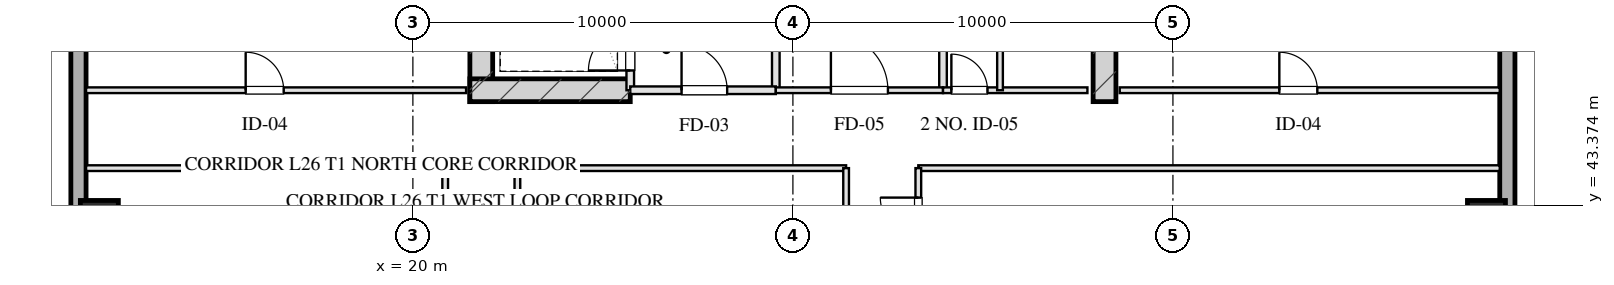
"""IFC4 building model, lengths in metres.
Left out: names, types, materials, properties, quantities, classifications, styles, units other than length and angle.
Written with IfcOpenShell. Run it as: python <this file> out.ifc"""

import sys

from ifc_helpers import new_model, si_unit, direction, frame, frame_2d, origin, origin_2d, place, context, subcontext, project, spatial, rectangle, hollow_rectangle, extrude, element, fill, save


model = new_model("IFC4")
c1 = context("Model", 3, precision=1e-05, world=origin(), true_north=direction((0.0, 1.0)))
c2 = subcontext(c1, "Body", "Model", "MODEL_VIEW")
j1 = project(units=[si_unit("LENGTHUNIT", "METRE"), si_unit("PLANEANGLEUNIT", "RADIAN")], contexts=[c1])
p1 = place(None, origin())
s1 = spatial("IfcSite", under=j1, at=p1, CompositionType="ELEMENT")
p2 = place(p1, origin())
s2 = spatial("IfcBuilding", under=s1, at=p2, CompositionType="ELEMENT")
p3 = place(p2, frame((0.0, 0.0, 103.5)))
s3 = spatial("IfcBuildingStorey", under=s2, at=p3, CompositionType="ELEMENT", Elevation=103.5)
for number, where, z_axis, x_axis in (
    (1, (21.8, 46.1, 0.0), (0.0, 0.0, 1.0), (0.0, 1.0, 0.0)),
    (2, (38.2, 46.1, 0.0), (0.0, 0.0, 1.0), (0.0, 1.0, 0.0)),
):
    element("IfcWall", number, at=place(p3, frame(where, z_axis=z_axis, x_axis=x_axis)), inside=s3, PredefinedType="SHEAR", context=c2, shape_type="SweptSolid", body=[
        extrude(rectangle(XDim=9.48, YDim=0.6, at=frame_2d((4.74, 0.0))), origin(), (0.0, 0.0, 1.0), 3.45),
    ])
p4 = place(p3, frame((21.5, 46.4, 0.0), z_axis=(0.0, 0.0, 1.0), x_axis=(1.0, 0.0, 0.0)))
e3 = element("IfcWall", 3, at=p4, inside=s3, PredefinedType="SHEAR", context=c2, shape_type="SweptSolid", body=[
    extrude(rectangle(XDim=4.22, YDim=0.6, at=frame_2d((2.11, 0.0))), origin(), (0.0, 0.0, 1.0), 3.45),
])
for number, where, z_axis, x_axis in (
    (4, (11.75, 43.0, 0.0), (0.0, 0.0, 1.0), (1.0, 0.0, 0.0)),
    (5, (48.25, 43.0, 0.0), (0.0, 0.0, 1.0), (1.0, 0.0, 0.0)),
):
    element("IfcColumn", number, at=place(p3, frame(where, z_axis=z_axis, x_axis=x_axis)), inside=s3, PredefinedType="COLUMN", context=c2, shape_type="SweptSolid", body=[
        extrude(hollow_rectangle(XDim=1.0, YDim=1.0, WallThickness=0.036, at=origin_2d()), origin(), (0.0, 0.0, 1.0), 3.451),
    ])
p5 = place(p3, frame((11.2, 9.0, 0.0), z_axis=(0.0, 0.0, 1.0), x_axis=(0.0, 1.0, 0.0)))
e6 = element("IfcWall", 6, at=p5, inside=s3, PredefinedType="SOLIDWALL", context=c2, shape_type="SweptSolid", body=[
    extrude(rectangle(XDim=50.0, YDim=0.4, at=frame_2d((25.0, 0.0))), origin(), (0.0, 0.0, 1.0), 2.61),
])
p6 = place(p5, frame((26.4, 0.0, 0.75)))
e7 = element("IfcOpeningElement", 7, at=p6, cuts=e6, PredefinedType="OPENING", context=c2, shape_type="SweptSolid", body=[
    extrude(rectangle(XDim=2.4, YDim=1.46, at=frame_2d((1.2, 0.73))), frame((0.0, 0.21, 0.0), z_axis=(0.0, -1.0, 0.0), x_axis=(1.0, 0.0, 0.0)), (0.0, 0.0, 1.0), 0.42),
])
p7 = place(p5, frame((21.35, 0.0, 0.0)))
e8 = element("IfcOpeningElement", 8, at=p7, cuts=e6, PredefinedType="OPENING", context=c2, shape_type="SweptSolid", body=[
    extrude(rectangle(XDim=1.1, YDim=2.15, at=frame_2d((0.55, 1.075))), frame((0.0, 0.21, 0.0), z_axis=(0.0, -1.0, 0.0), x_axis=(1.0, 0.0, 0.0)), (0.0, 0.0, 1.0), 0.42),
])
p8 = place(p3, frame((48.8, 59.0, 0.0), z_axis=(0.0, 0.0, 1.0), x_axis=(0.0, -1.0, 0.0)))
e9 = element("IfcWall", 9, at=p8, inside=s3, PredefinedType="SOLIDWALL", context=c2, shape_type="SweptSolid", body=[
    extrude(rectangle(XDim=50.0, YDim=0.4, at=frame_2d((25.0, 0.0))), origin(), (0.0, 0.0, 1.0), 2.61),
])
p9 = place(p8, frame((27.55, 0.0, 0.0)))
e10 = element("IfcOpeningElement", 10, at=p9, cuts=e9, PredefinedType="OPENING", context=c2, shape_type="SweptSolid", body=[
    extrude(rectangle(XDim=1.1, YDim=2.15, at=frame_2d((0.55, 1.075))), frame((0.0, 0.21, 0.0), z_axis=(0.0, -1.0, 0.0), x_axis=(1.0, 0.0, 0.0)), (0.0, 0.0, 1.0), 0.42),
])
p10 = place(p3, frame((25.72, 46.4, 0.0), z_axis=(0.0, 0.0, 1.0), x_axis=(0.0, 1.0, 0.0)))
e11 = element("IfcWall", 11, at=p10, inside=s3, PredefinedType="PARTITIONING", context=c2, shape_type="SweptSolid", body=[
    extrude(rectangle(XDim=1.9, YDim=0.2, at=frame_2d((0.95, 0.0))), origin(), (0.0, 0.0, 1.0), 3.175),
])
p11 = place(p10, frame((0.52, 0.0, 0.0)))
e12 = element("IfcOpeningElement", 12, at=p11, cuts=e11, PredefinedType="OPENING", context=c2, shape_type="SweptSolid", body=[
    extrude(rectangle(XDim=1.1, YDim=2.05, at=frame_2d((0.55, 1.025))), frame((0.0, 0.11, 0.0), z_axis=(0.0, -1.0, 0.0), x_axis=(1.0, 0.0, 0.0)), (0.0, 0.0, 1.0), 0.22),
])
p12 = place(p3, frame((29.55, 46.4, 0.0), z_axis=(0.0, 0.0, 1.0), x_axis=(0.0, 1.0, 0.0)))
e13 = element("IfcWall", 13, at=p12, inside=s3, PredefinedType="PARTITIONING", context=c2, shape_type="SweptSolid", body=[
    extrude(rectangle(XDim=8.43, YDim=0.2, at=frame_2d((4.215, 0.0))), origin(), (0.0, 0.0, 1.0), 3.175),
])
p13 = place(p3, frame((25.72, 46.4, 0.0), z_axis=(0.0, 0.0, 1.0), x_axis=(1.0, 0.0, 0.0)))
e14 = element("IfcWall", 14, at=p13, inside=s3, PredefinedType="PARTITIONING", context=c2, shape_type="SweptSolid", body=[
    extrude(rectangle(XDim=3.83, YDim=0.2, at=frame_2d((1.915, 0.0))), origin(), (0.0, 0.0, 1.0), 3.175),
])
p14 = place(p13, frame((1.35, 0.0, 0.0)))
e15 = element("IfcOpeningElement", 15, at=p14, cuts=e14, PredefinedType="OPENING", context=c2, shape_type="SweptSolid", body=[
    extrude(rectangle(XDim=1.2, YDim=2.05, at=frame_2d((0.6, 1.025))), frame((0.0, 0.11, 0.0), z_axis=(0.0, -1.0, 0.0), x_axis=(1.0, 0.0, 0.0)), (0.0, 0.0, 1.0), 0.22),
])
p15 = place(p3, frame((33.95, 46.4, 0.0), z_axis=(0.0, 0.0, 1.0), x_axis=(0.0, 1.0, 0.0)))
e16 = element("IfcWall", 16, at=p15, inside=s3, PredefinedType="PARTITIONING", context=c2, shape_type="SweptSolid", body=[
    extrude(rectangle(XDim=8.43, YDim=0.2, at=frame_2d((4.215, 0.0))), origin(), (0.0, 0.0, 1.0), 3.175),
])
p16 = place(p3, frame((29.55, 46.4, 0.0), z_axis=(0.0, 0.0, 1.0), x_axis=(1.0, 0.0, 0.0)))
e17 = element("IfcWall", 17, at=p16, inside=s3, PredefinedType="PARTITIONING", context=c2, shape_type="SweptSolid", body=[
    extrude(rectangle(XDim=4.4, YDim=0.15, at=frame_2d((2.2, 0.0))), origin(), (0.0, 0.0, 1.0), 3.175),
])
p17 = place(p16, frame((1.45, 0.0, 0.0)))
e18 = element("IfcOpeningElement", 18, at=p17, cuts=e17, PredefinedType="OPENING", context=c2, shape_type="SweptSolid", body=[
    extrude(rectangle(XDim=1.5, YDim=2.05, at=frame_2d((0.75, 1.025))), frame((0.0, 0.085, 0.0), z_axis=(0.0, -1.0, 0.0), x_axis=(1.0, 0.0, 0.0)), (0.0, 0.0, 1.0), 0.17),
])
p18 = place(p3, frame((33.95, 46.4, 0.0), z_axis=(0.0, 0.0, 1.0), x_axis=(1.0, 0.0, 0.0)))
e19 = element("IfcWall", 19, at=p18, inside=s3, PredefinedType="PARTITIONING", context=c2, shape_type="SweptSolid", body=[
    extrude(rectangle(XDim=3.8, YDim=0.15, at=frame_2d((1.9, 0.0))), origin(), (0.0, 0.0, 1.0), 3.175),
])
p19 = place(p18, frame((0.22, 0.0, 0.0)))
e20 = element("IfcOpeningElement", 20, at=p19, cuts=e19, PredefinedType="OPENING", context=c2, shape_type="SweptSolid", body=[
    extrude(rectangle(XDim=0.95, YDim=2.05, at=frame_2d((0.475, 1.025))), frame((0.0, 0.085, 0.0), z_axis=(0.0, -1.0, 0.0), x_axis=(1.0, 0.0, 0.0)), (0.0, 0.0, 1.0), 0.17),
])
p20 = place(p3, frame((35.45, 46.4, 0.0), z_axis=(0.0, 0.0, 1.0), x_axis=(0.0, 1.0, 0.0)))
e21 = element("IfcWall", 21, at=p20, inside=s3, PredefinedType="PARTITIONING", context=c2, shape_type="SweptSolid", body=[
    extrude(rectangle(XDim=8.43, YDim=0.15, at=frame_2d((4.215, 0.0))), origin(), (0.0, 0.0, 1.0), 2.765),
])
p21 = place(p20, frame((2.55, 0.0, 0.0)))
e22 = element("IfcOpeningElement", 22, at=p21, cuts=e21, PredefinedType="OPENING", context=c2, shape_type="SweptSolid", body=[
    extrude(rectangle(XDim=0.95, YDim=2.05, at=frame_2d((0.475, 1.025))), frame((0.0, 0.085, 0.0), z_axis=(0.0, -1.0, 0.0), x_axis=(1.0, 0.0, 0.0)), (0.0, 0.0, 1.0), 0.17),
])
p22 = place(p20, frame((4.7, 0.0, 0.0)))
e23 = element("IfcOpeningElement", 23, at=p22, cuts=e21, PredefinedType="OPENING", context=c2, shape_type="SweptSolid", body=[
    extrude(rectangle(XDim=0.9, YDim=2.05, at=frame_2d((0.45, 1.025))), frame((0.0, 0.085, 0.0), z_axis=(0.0, -1.0, 0.0), x_axis=(1.0, 0.0, 0.0)), (0.0, 0.0, 1.0), 0.17),
])
p23 = place(p20, frame((6.8, 0.0, 0.0)))
e24 = element("IfcOpeningElement", 24, at=p23, cuts=e21, PredefinedType="OPENING", context=c2, shape_type="SweptSolid", body=[
    extrude(rectangle(XDim=0.9, YDim=2.05, at=frame_2d((0.45, 1.025))), frame((0.0, 0.085, 0.0), z_axis=(0.0, -1.0, 0.0), x_axis=(1.0, 0.0, 0.0)), (0.0, 0.0, 1.0), 0.17),
])
p24 = place(p3, frame((11.4, 46.4, 0.0), z_axis=(0.0, 0.0, 1.0), x_axis=(1.0, 0.0, 0.0)))
e25 = element("IfcWall", 25, at=p24, inside=s3, PredefinedType="PARTITIONING", context=c2, shape_type="SweptSolid", body=[
    extrude(rectangle(XDim=10.0, YDim=0.15, at=frame_2d((5.0, 0.0))), origin(), (0.0, 0.0, 1.0), 3.175),
])
p25 = place(p24, frame((4.2, 0.0, 0.0)))
e26 = element("IfcOpeningElement", 26, at=p25, cuts=e25, PredefinedType="OPENING", context=c2, shape_type="SweptSolid", body=[
    extrude(rectangle(XDim=1.0, YDim=2.05, at=frame_2d((0.5, 1.025))), frame((0.0, 0.085, 0.0), z_axis=(0.0, -1.0, 0.0), x_axis=(1.0, 0.0, 0.0)), (0.0, 0.0, 1.0), 0.17),
])
p26 = place(p3, frame((38.6, 46.4, 0.0), z_axis=(0.0, 0.0, 1.0), x_axis=(1.0, 0.0, 0.0)))
e27 = element("IfcWall", 27, at=p26, inside=s3, PredefinedType="PARTITIONING", context=c2, shape_type="SweptSolid", body=[
    extrude(rectangle(XDim=10.0, YDim=0.15, at=frame_2d((5.0, 0.0))), origin(), (0.0, 0.0, 1.0), 3.175),
])
p27 = place(p26, frame((4.2, 0.0, 0.0)))
e28 = element("IfcOpeningElement", 28, at=p27, cuts=e27, PredefinedType="OPENING", context=c2, shape_type="SweptSolid", body=[
    extrude(rectangle(XDim=1.0, YDim=2.05, at=frame_2d((0.5, 1.025))), frame((0.0, 0.085, 0.0), z_axis=(0.0, -1.0, 0.0), x_axis=(1.0, 0.0, 0.0)), (0.0, 0.0, 1.0), 0.17),
])
p28 = place(p3, frame((11.4, 44.35, 0.0), z_axis=(0.0, 0.0, 1.0), x_axis=(1.0, 0.0, 0.0)))
e29 = element("IfcWall", 29, at=p28, inside=s3, PredefinedType="PARTITIONING", context=c2, shape_type="SweptSolid", body=[
    extrude(rectangle(XDim=9.45, YDim=0.15, at=frame_2d((4.725, 0.0))), origin(), (0.0, 0.0, 1.0), 3.175),
])
p29 = place(p3, frame((22.75, 44.35, 0.0), z_axis=(0.0, 0.0, 1.0), x_axis=(1.0, 0.0, 0.0)))
e30 = element("IfcWall", 30, at=p29, inside=s3, PredefinedType="PARTITIONING", context=c2, shape_type="SweptSolid", body=[
    extrude(rectangle(XDim=8.65, YDim=0.15, at=frame_2d((4.325, 0.0))), origin(), (0.0, 0.0, 1.0), 3.175),
])
p30 = place(p3, frame((33.3, 44.35, 0.0), z_axis=(0.0, 0.0, 1.0), x_axis=(1.0, 0.0, 0.0)))
e31 = element("IfcWall", 31, at=p30, inside=s3, PredefinedType="PARTITIONING", context=c2, shape_type="SweptSolid", body=[
    extrude(rectangle(XDim=15.3, YDim=0.15, at=frame_2d((7.65, 0.0))), origin(), (0.0, 0.0, 1.0), 3.175),
])
p31 = place(p3, frame((20.85, 23.65, 0.0), z_axis=(0.0, 0.0, 1.0), x_axis=(0.0, 1.0, 0.0)))
e32 = element("IfcWall", 32, at=p31, inside=s3, PredefinedType="PARTITIONING", context=c2, shape_type="SweptSolid", body=[
    extrude(rectangle(XDim=20.7, YDim=0.15, at=frame_2d((10.35, 0.0))), origin(), (0.0, 0.0, 1.0), 3.175),
])
p32 = place(p31, frame((2.175, 0.0, 0.0)))
e33 = element("IfcOpeningElement", 33, at=p32, cuts=e32, PredefinedType="OPENING", context=c2, shape_type="SweptSolid", body=[
    extrude(rectangle(XDim=1.05, YDim=2.05, at=frame_2d((0.525, 1.025))), frame((0.0, 0.085, 0.0), z_axis=(0.0, -1.0, 0.0), x_axis=(1.0, 0.0, 0.0)), (0.0, 0.0, 1.0), 0.17),
])
p33 = place(p31, frame((7.69, 0.0, 0.0)))
e34 = element("IfcOpeningElement", 34, at=p33, cuts=e32, PredefinedType="OPENING", context=c2, shape_type="SweptSolid", body=[
    extrude(rectangle(XDim=1.0, YDim=2.05, at=frame_2d((0.5, 1.025))), frame((0.0, 0.085, 0.0), z_axis=(0.0, -1.0, 0.0), x_axis=(1.0, 0.0, 0.0)), (0.0, 0.0, 1.0), 0.17),
])
p34 = place(p31, frame((12.69, 0.0, 0.0)))
e35 = element("IfcOpeningElement", 35, at=p34, cuts=e32, PredefinedType="OPENING", context=c2, shape_type="SweptSolid", body=[
    extrude(rectangle(XDim=1.0, YDim=2.05, at=frame_2d((0.5, 1.025))), frame((0.0, 0.085, 0.0), z_axis=(0.0, -1.0, 0.0), x_axis=(1.0, 0.0, 0.0)), (0.0, 0.0, 1.0), 0.17),
])
p35 = place(p31, frame((17.525, 0.0, 0.0)))
e36 = element("IfcOpeningElement", 36, at=p35, cuts=e32, PredefinedType="OPENING", context=c2, shape_type="SweptSolid", body=[
    extrude(rectangle(XDim=1.0, YDim=2.05, at=frame_2d((0.5, 1.025))), frame((0.0, 0.085, 0.0), z_axis=(0.0, -1.0, 0.0), x_axis=(1.0, 0.0, 0.0)), (0.0, 0.0, 1.0), 0.17),
])
p36 = place(p3, frame((22.75, 23.65, 0.0), z_axis=(0.0, 0.0, 1.0), x_axis=(0.0, 1.0, 0.0)))
e37 = element("IfcWall", 37, at=p36, inside=s3, PredefinedType="PARTITIONING", context=c2, shape_type="SweptSolid", body=[
    extrude(rectangle(XDim=20.7, YDim=0.15, at=frame_2d((10.35, 0.0))), origin(), (0.0, 0.0, 1.0), 3.175),
])
p37 = place(p36, frame((9.936, 0.0, 0.0)))
e38 = element("IfcOpeningElement", 38, at=p37, cuts=e37, PredefinedType="OPENING", context=c2, shape_type="SweptSolid", body=[
    extrude(rectangle(XDim=1.1, YDim=2.05, at=frame_2d((0.55, 1.025))), frame((0.0, 0.085, 0.0), z_axis=(0.0, -1.0, 0.0), x_axis=(1.0, 0.0, 0.0)), (0.0, 0.0, 1.0), 0.17),
])
p38 = place(p3, frame((31.4, 23.65, 0.0), z_axis=(0.0, 0.0, 1.0), x_axis=(0.0, 1.0, 0.0)))
e39 = element("IfcWall", 39, at=p38, inside=s3, PredefinedType="PARTITIONING", context=c2, shape_type="SweptSolid", body=[
    extrude(rectangle(XDim=20.7, YDim=0.15, at=frame_2d((10.35, 0.0))), origin(), (0.0, 0.0, 1.0), 3.175),
])
p39 = place(p3, frame((33.3, 23.65, 0.0), z_axis=(0.0, 0.0, 1.0), x_axis=(0.0, 1.0, 0.0)))
e40 = element("IfcWall", 40, at=p39, inside=s3, PredefinedType="PARTITIONING", context=c2, shape_type="SweptSolid", body=[
    extrude(rectangle(XDim=20.7, YDim=0.15, at=frame_2d((10.35, 0.0))), origin(), (0.0, 0.0, 1.0), 3.175),
])
p40 = place(p39, frame((2.175, 0.0, 0.0)))
e41 = element("IfcOpeningElement", 41, at=p40, cuts=e40, PredefinedType="OPENING", context=c2, shape_type="SweptSolid", body=[
    extrude(rectangle(XDim=1.0, YDim=2.05, at=frame_2d((0.5, 1.025))), frame((0.0, 0.085, 0.0), z_axis=(0.0, -1.0, 0.0), x_axis=(1.0, 0.0, 0.0)), (0.0, 0.0, 1.0), 0.17),
])
p41 = place(p39, frame((6.75, 0.0, 0.0)))
e42 = element("IfcOpeningElement", 42, at=p41, cuts=e40, PredefinedType="OPENING", context=c2, shape_type="SweptSolid", body=[
    extrude(rectangle(XDim=0.85, YDim=2.05, at=frame_2d((0.425, 1.025))), frame((0.0, 0.085, 0.0), z_axis=(0.0, -1.0, 0.0), x_axis=(1.0, 0.0, 0.0)), (0.0, 0.0, 1.0), 0.17),
])
p42 = place(p39, frame((11.25, 0.0, 0.0)))
e43 = element("IfcOpeningElement", 43, at=p42, cuts=e40, PredefinedType="OPENING", context=c2, shape_type="SweptSolid", body=[
    extrude(rectangle(XDim=1.05, YDim=2.05, at=frame_2d((0.525, 1.025))), frame((0.0, 0.085, 0.0), z_axis=(0.0, -1.0, 0.0), x_axis=(1.0, 0.0, 0.0)), (0.0, 0.0, 1.0), 0.17),
])
p43 = place(p39, frame((15.75, 0.0, 0.0)))
e44 = element("IfcOpeningElement", 44, at=p43, cuts=e40, PredefinedType="OPENING", context=c2, shape_type="SweptSolid", body=[
    extrude(rectangle(XDim=1.0, YDim=2.05, at=frame_2d((0.5, 1.025))), frame((0.0, 0.085, 0.0), z_axis=(0.0, -1.0, 0.0), x_axis=(1.0, 0.0, 0.0)), (0.0, 0.0, 1.0), 0.17),
])
p44 = place(p39, frame((18.925, 0.0, 0.0)))
e45 = element("IfcOpeningElement", 45, at=p44, cuts=e40, PredefinedType="OPENING", context=c2, shape_type="SweptSolid", body=[
    extrude(rectangle(XDim=1.0, YDim=2.05, at=frame_2d((0.5, 1.025))), frame((0.0, 0.085, 0.0), z_axis=(0.0, -1.0, 0.0), x_axis=(1.0, 0.0, 0.0)), (0.0, 0.0, 1.0), 0.17),
])
p45 = place(p11, origin())
e46 = element("IfcDoor", 46, at=p45, inside=s3, OperationType="SINGLE_SWING_LEFT", PredefinedType="DOOR", context=c2, shape_type="SweptSolid", body=[
    extrude(rectangle(XDim=1.1, YDim=2.05, at=frame_2d((0.55, 1.025))), frame((0.0, 0.025, 0.0), z_axis=(0.0, -1.0, 0.0), x_axis=(1.0, 0.0, 0.0)), (0.0, 0.0, 1.0), 0.05),
])
fill(e12, e46)
p46 = place(p14, origin())
e47 = element("IfcDoor", 47, at=p46, inside=s3, OperationType="SINGLE_SWING_LEFT", PredefinedType="DOOR", context=c2, shape_type="SweptSolid", body=[
    extrude(rectangle(XDim=1.2, YDim=2.05, at=frame_2d((0.6, 1.025))), frame((0.0, 0.025, 0.0), z_axis=(0.0, -1.0, 0.0), x_axis=(1.0, 0.0, 0.0)), (0.0, 0.0, 1.0), 0.05),
])
fill(e15, e47)
p47 = place(p17, origin())
e48 = element("IfcDoor", 48, at=p47, inside=s3, OperationType="SINGLE_SWING_LEFT", PredefinedType="DOOR", context=c2, shape_type="SweptSolid", body=[
    extrude(rectangle(XDim=1.5, YDim=2.05, at=frame_2d((0.75, 1.025))), frame((0.0, 0.025, 0.0), z_axis=(0.0, -1.0, 0.0), x_axis=(1.0, 0.0, 0.0)), (0.0, 0.0, 1.0), 0.05),
])
fill(e18, e48)
p48 = place(p19, origin())
e49 = element("IfcDoor", 49, at=p48, inside=s3, OperationType="SINGLE_SWING_LEFT", PredefinedType="DOOR", context=c2, shape_type="SweptSolid", body=[
    extrude(rectangle(XDim=0.95, YDim=2.05, at=frame_2d((0.475, 1.025))), frame((0.0, 0.025, 0.0), z_axis=(0.0, -1.0, 0.0), x_axis=(1.0, 0.0, 0.0)), (0.0, 0.0, 1.0), 0.05),
])
fill(e20, e49)
p49 = place(p25, origin())
e50 = element("IfcDoor", 50, at=p49, inside=s3, OperationType="SINGLE_SWING_LEFT", PredefinedType="DOOR", context=c2, shape_type="SweptSolid", body=[
    extrude(rectangle(XDim=1.0, YDim=2.05, at=frame_2d((0.5, 1.025))), frame((0.0, 0.025, 0.0), z_axis=(0.0, -1.0, 0.0), x_axis=(1.0, 0.0, 0.0)), (0.0, 0.0, 1.0), 0.05),
])
fill(e26, e50)
p50 = place(p27, origin())
e51 = element("IfcDoor", 51, at=p50, inside=s3, OperationType="SINGLE_SWING_LEFT", PredefinedType="DOOR", context=c2, shape_type="SweptSolid", body=[
    extrude(rectangle(XDim=1.0, YDim=2.05, at=frame_2d((0.5, 1.025))), frame((0.0, 0.025, 0.0), z_axis=(0.0, -1.0, 0.0), x_axis=(1.0, 0.0, 0.0)), (0.0, 0.0, 1.0), 0.05),
])
fill(e28, e51)
p51 = place(p44, origin())
e52 = element("IfcDoor", 52, at=p51, inside=s3, OperationType="SINGLE_SWING_RIGHT", PredefinedType="DOOR", context=c2, shape_type="SweptSolid", body=[
    extrude(rectangle(XDim=1.0, YDim=2.05, at=frame_2d((0.5, 1.025))), frame((0.0, 0.025, 0.0), z_axis=(0.0, -1.0, 0.0), x_axis=(1.0, 0.0, 0.0)), (0.0, 0.0, 1.0), 0.05),
])
fill(e45, e52)
save(model, sys.argv[1])
